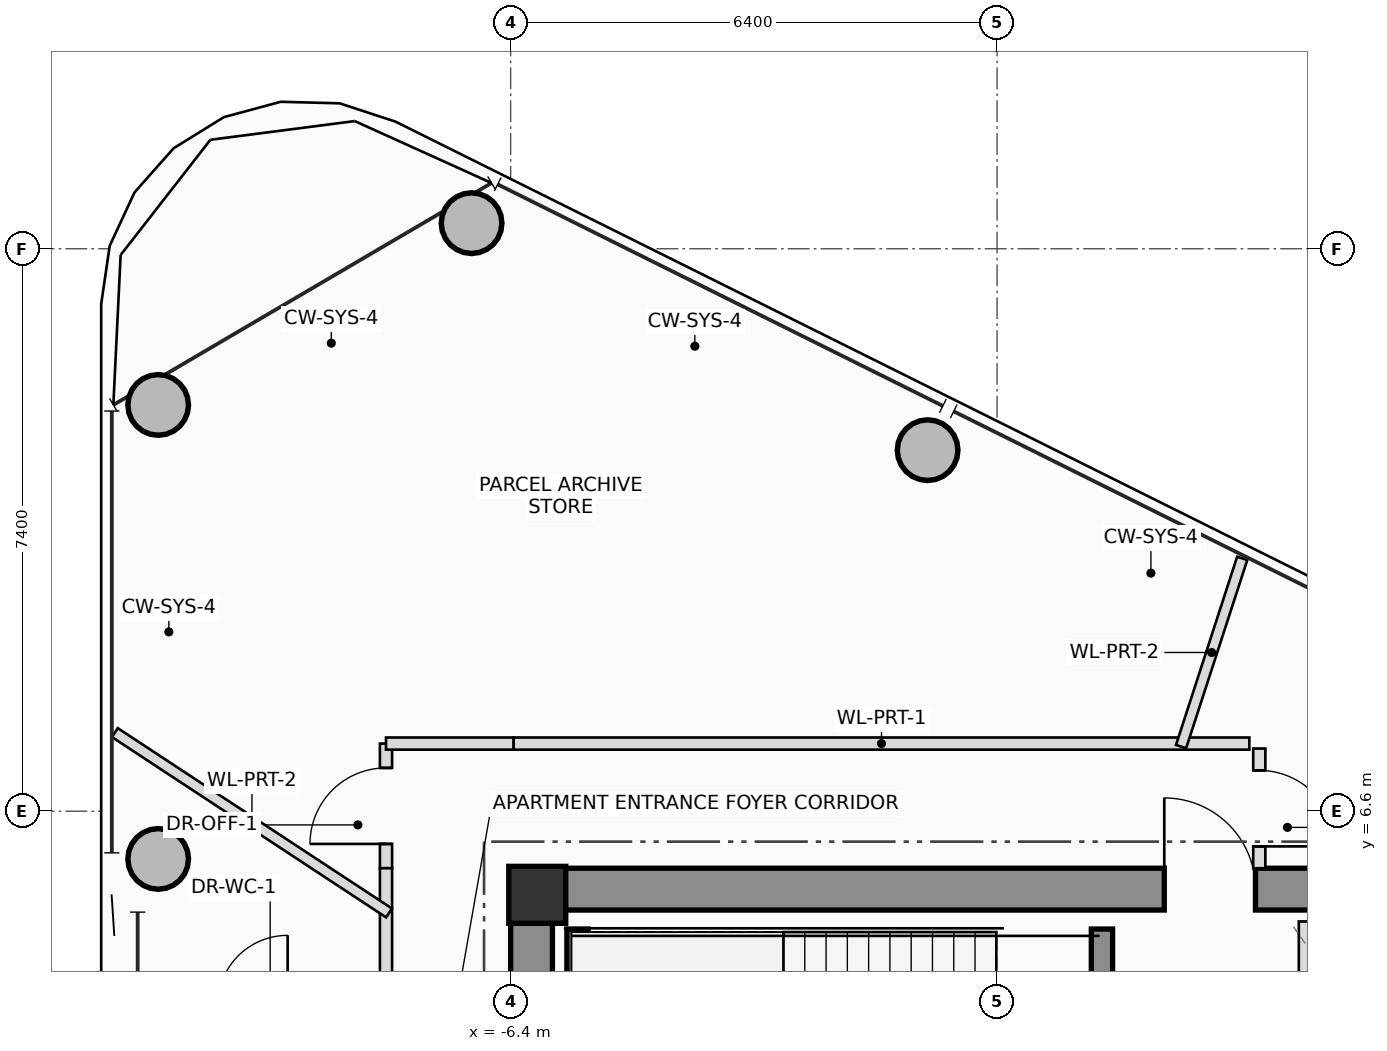
"""IFC4 building model, lengths in metres.
Left out: names, types, materials, properties, quantities, classifications, styles, units other than length and angle.
Written with IfcOpenShell. Run it as: python <this file> out.ifc"""

import sys

from ifc_helpers import new_model, si_unit, direction, frame, frame_2d, origin, origin_2d, place, context, subcontext, project, spatial, rectangle, hollow_circle, extrude, source, transform, mapped, element, fill, save


model = new_model("IFC4")
c1 = context("Model", 3, precision=1e-05, world=origin(), true_north=direction((0.0, 1.0)))
c2 = subcontext(c1, "Body", "Model", "MODEL_VIEW")
j1 = project(units=[si_unit("LENGTHUNIT", "METRE"), si_unit("PLANEANGLEUNIT", "RADIAN")], contexts=[c1])
p1 = place(None, origin())
s1 = spatial("IfcSite", under=j1, at=p1, CompositionType="ELEMENT")
p2 = place(p1, origin())
s2 = spatial("IfcBuilding", under=s1, at=p2, CompositionType="ELEMENT")
p3 = place(p2, frame((0.0, 0.0, 293.3)))
s3 = spatial("IfcBuildingStorey", under=s2, at=p3, CompositionType="ELEMENT", Elevation=293.3)
m1 = source(origin(), c2, "Body", "SweptSolid", [
    extrude(rectangle(XDim=0.75, YDim=0.75, at=origin_2d()), origin(), (0.0, 0.0, 1.0), 3.45),
])
p4 = place(p3, frame((-6.05, 5.5, 0.0), z_axis=(0.0, 0.0, 1.0), x_axis=(1.0, 0.0, 0.0)))
e1 = element("IfcColumn", 1, at=p4, inside=s3, PredefinedType="COLUMN", context=c2, shape_type="MappedRepresentation", body=[
    mapped(m1, transform((0.0, 0.0, 0.0), scale=1.0)),
])
p5 = place(p3, frame((-6.4, 5.575, 0.0), z_axis=(0.0, 0.0, 1.0), x_axis=(1.0, 0.0, 0.0)))
e2 = element("IfcWall", 2, at=p5, inside=s3, PredefinedType="SHEAR", context=c2, shape_type="SweptSolid", body=[
    extrude(rectangle(XDim=12.8, YDim=0.55, at=frame_2d((6.4, 0.0))), origin(), (0.0, 0.0, 1.0), 3.45),
])
p6 = place(p5, frame((8.6, 0.0, 0.0)))
e3 = element("IfcOpeningElement", 3, at=p6, cuts=e2, PredefinedType="OPENING", context=c2, shape_type="SweptSolid", body=[
    extrude(rectangle(XDim=1.2, YDim=2.2, at=frame_2d((0.6, 1.1))), frame((0.0, 0.285, 0.0), z_axis=(0.0, -1.0, 0.0), x_axis=(1.0, 0.0, 0.0)), (0.0, 0.0, 1.0), 0.57),
])
p7 = place(p3, frame((-6.125, 1.75, 0.0), z_axis=(0.0, 0.0, 1.0), x_axis=(0.0, 1.0, 0.0)))
e4 = element("IfcWall", 4, at=p7, inside=s3, PredefinedType="SHEAR", context=c2, shape_type="SweptSolid", body=[
    extrude(rectangle(XDim=3.55, YDim=0.55, at=frame_2d((1.775, 0.0))), origin(), (0.0, 0.0, 1.0), 3.45),
])
p8 = place(p3, frame((-5.52, 2.3, 0.0), z_axis=(0.0, 0.0, 1.0), x_axis=(0.0, 1.0, 0.0)))
e5 = element("IfcWall", 5, at=p8, inside=s3, PredefinedType="SHEAR", context=c2, shape_type="SweptSolid", body=[
    extrude(rectangle(XDim=2.75, YDim=0.28, at=frame_2d((1.375, 0.0))), origin(), (0.0, 0.0, 1.0), 3.45),
])
p9 = place(p3, frame((1.38, 4.25, 0.0), z_axis=(0.0, 0.0, 1.0), x_axis=(0.0, 1.0, 0.0)))
e6 = element("IfcWall", 6, at=p9, inside=s3, PredefinedType="SHEAR", context=c2, shape_type="SweptSolid", body=[
    extrude(rectangle(XDim=0.8, YDim=0.28, at=frame_2d((0.4, 0.0))), origin(), (0.0, 0.0, 1.0), 3.45),
])
m2 = source(origin(), c2, "Body", "SweptSolid", [
    extrude(hollow_circle(Radius=0.4, WallThickness=0.028, at=origin_2d()), origin(), (0.0, 0.0, 1.0), 3.45),
])
for number, where, z_axis, x_axis in (
    (7, (-0.914, 11.35, 0.0), (0.0, 0.0, 1.0), (1.0, 0.0, 0.0)),
    (8, (-6.914, 14.337, 0.0), (0.0, 0.0, 1.0), (1.0, 0.0, 0.0)),
    (9, (-11.037, 11.945, 0.0), (0.0, 0.0, 1.0), (1.0, 0.0, 0.0)),
    (10, (-11.037, 5.973, 0.0), (0.0, 0.0, 1.0), (1.0, 0.0, 0.0)),
):
    element("IfcColumn", number, at=place(p3, frame(where, z_axis=z_axis, x_axis=x_axis)), inside=s3, PredefinedType="COLUMN", context=c2, shape_type="MappedRepresentation", body=[
        mapped(m2, transform((0.0, 0.0, 0.0), scale=1.0)),
    ])
p10 = place(p3, frame((4.08, 2.2, 0.0), z_axis=(0.0, 0.0, 1.0), x_axis=(0.0, 1.0, 0.0)))
e11 = element("IfcWall", 11, at=p10, inside=s3, PredefinedType="PLUMBINGWALL", context=c2, shape_type="SweptSolid", body=[
    extrude(rectangle(XDim=2.95, YDim=0.22, at=frame_2d((1.475, 0.0))), origin(), (0.0, 0.0, 1.0), 3.25),
])
p11 = place(p10, frame((0.75, 0.0, 0.0)))
e12 = element("IfcOpeningElement", 12, at=p11, cuts=e11, PredefinedType="OPENING", context=c2, shape_type="SweptSolid", body=[
    extrude(rectangle(XDim=1.2, YDim=2.25, at=frame_2d((0.6, 1.125))), frame((0.0, 0.12, 0.0), z_axis=(0.0, -1.0, 0.0), x_axis=(1.0, 0.0, 0.0)), (0.0, 0.0, 1.0), 0.24),
])
p12 = place(p3, frame((-8.04, 5.85, 0.0), z_axis=(0.0, 0.0, 1.0), x_axis=(0.0, 1.0, 0.0)))
e13 = element("IfcWall", 13, at=p12, inside=s3, PredefinedType="PARTITIONING", context=c2, shape_type="SweptSolid", body=[
    extrude(rectangle(XDim=1.64, YDim=0.16, at=frame_2d((0.82, 0.0))), origin(), (0.0, 0.0, 1.0), 2.905),
])
p13 = place(p12, frame((0.32, 0.0, 0.0)))
e14 = element("IfcOpeningElement", 14, at=p13, cuts=e13, PredefinedType="OPENING", context=c2, shape_type="SweptSolid", body=[
    extrude(rectangle(XDim=1.0, YDim=2.25, at=frame_2d((0.5, 1.125))), frame((0.0, 0.09, 0.0), z_axis=(0.0, -1.0, 0.0), x_axis=(1.0, 0.0, 0.0)), (0.0, 0.0, 1.0), 0.18),
])
p14 = place(p3, frame((-8.04, 7.49, 0.0), z_axis=(0.0, 0.0, 1.0), x_axis=(1.0, 0.0, 0.0)))
e15 = element("IfcWall", 15, at=p14, inside=s3, PredefinedType="PARTITIONING", context=c2, shape_type="SweptSolid", body=[
    extrude(rectangle(XDim=1.68, YDim=0.16, at=frame_2d((0.84, 0.0))), origin(), (0.0, 0.0, 1.0), 2.655),
])
p15 = place(p3, frame((-6.36, 7.49, 0.0), z_axis=(0.0, 0.0, 1.0), x_axis=(1.0, 0.0, 0.0)))
e16 = element("IfcWall", 16, at=p15, inside=s3, PredefinedType="PARTITIONING", context=c2, shape_type="SweptSolid", body=[
    extrude(rectangle(XDim=9.679, YDim=0.16, at=frame_2d((4.84, 0.0))), origin(), (0.0, 0.0, 1.0), 2.655),
])
p16 = place(p3, frame((3.45, 7.425, 0.0), z_axis=(0.0, 0.0, 1.0), x_axis=(0.0, -1.0, 0.0)))
e17 = element("IfcWall", 17, at=p16, inside=s3, PredefinedType="PARTITIONING", context=c2, shape_type="SweptSolid", body=[
    extrude(rectangle(XDim=1.575, YDim=0.16, at=frame_2d((0.787, 0.0))), origin(), (0.0, 0.0, 1.0), 2.855),
])
p17 = place(p16, frame((0.287, 0.0, 0.0)))
e18 = element("IfcOpeningElement", 18, at=p17, cuts=e17, PredefinedType="OPENING", context=c2, shape_type="SweptSolid", body=[
    extrude(rectangle(XDim=1.0, YDim=2.25, at=frame_2d((0.5, 1.125))), frame((0.0, 0.09, 0.0), z_axis=(0.0, -1.0, 0.0), x_axis=(1.0, 0.0, 0.0)), (0.0, 0.0, 1.0), 0.18),
])
p18 = place(p3, frame((-8.04, -5.85, 0.0), z_axis=(0.0, 0.0, 1.0), x_axis=(0.0, 1.0, 0.0)))
e19 = element("IfcWall", 19, at=p18, inside=s3, PredefinedType="PARTITIONING", context=c2, shape_type="SweptSolid", body=[
    extrude(rectangle(XDim=11.7, YDim=0.16, at=frame_2d((5.85, 0.0))), origin(), (0.0, 0.0, 1.0), 2.655),
])
p19 = place(p18, frame((5.189, 0.0, 0.0)))
e20 = element("IfcOpeningElement", 20, at=p19, cuts=e19, PredefinedType="OPENING", context=c2, shape_type="SweptSolid", body=[
    extrude(rectangle(XDim=1.0, YDim=2.25, at=frame_2d((0.5, 1.125))), frame((0.0, 0.09, 0.0), z_axis=(0.0, -1.0, 0.0), x_axis=(1.0, 0.0, 0.0)), (0.0, 0.0, 1.0), 0.18),
])
p20 = place(p3, frame((2.421, 7.45, 0.0), z_axis=(0.0, 0.0, 1.0), x_axis=(0.309047920595, 0.951046467201, 0.0)))
e21 = element("IfcWall", 21, at=p20, inside=s3, PredefinedType="PARTITIONING", context=c2, shape_type="SweptSolid", body=[
    extrude(rectangle(XDim=2.604, YDim=0.14, at=frame_2d((1.302, 0.0))), origin(), (0.0, 0.0, 1.0), 2.815),
])
p21 = place(p3, frame((-8.0, 5.262, 0.0), z_axis=(0.0, 0.0, 1.0), x_axis=(-0.835496328285, 0.549496028578, 0.0)))
e22 = element("IfcWall", 22, at=p21, inside=s3, PredefinedType="PARTITIONING", context=c2, shape_type="SweptSolid", body=[
    extrude(rectangle(XDim=4.318, YDim=0.14, at=frame_2d((2.159, 0.0))), origin(), (0.0, 0.0, 1.0), 2.655),
])
p22 = place(p6, origin())
e23 = element("IfcDoor", 23, at=p22, inside=s3, OperationType="SINGLE_SWING_LEFT", PredefinedType="DOOR", context=c2, shape_type="SweptSolid", body=[
    extrude(rectangle(XDim=1.2, YDim=2.2, at=frame_2d((0.6, 1.1))), frame((0.0, 0.025, 0.0), z_axis=(0.0, -1.0, 0.0), x_axis=(1.0, 0.0, 0.0)), (0.0, 0.0, 1.0), 0.05),
])
fill(e3, e23)
p23 = place(p13, origin())
e24 = element("IfcDoor", 24, at=p23, inside=s3, OperationType="SINGLE_SWING_LEFT", PredefinedType="DOOR", context=c2, shape_type="SweptSolid", body=[
    extrude(rectangle(XDim=1.0, YDim=2.25, at=frame_2d((0.5, 1.125))), frame((0.0, 0.025, 0.0), z_axis=(0.0, -1.0, 0.0), x_axis=(1.0, 0.0, 0.0)), (0.0, 0.0, 1.0), 0.05),
])
fill(e14, e24)
p24 = place(p17, origin())
e25 = element("IfcDoor", 25, at=p24, inside=s3, OperationType="SINGLE_SWING_RIGHT", PredefinedType="DOOR", context=c2, shape_type="SweptSolid", body=[
    extrude(rectangle(XDim=1.0, YDim=2.25, at=frame_2d((0.5, 1.125))), frame((0.0, 0.025, 0.0), z_axis=(0.0, -1.0, 0.0), x_axis=(1.0, 0.0, 0.0)), (0.0, 0.0, 1.0), 0.05),
])
fill(e18, e25)
save(model, sys.argv[1])
